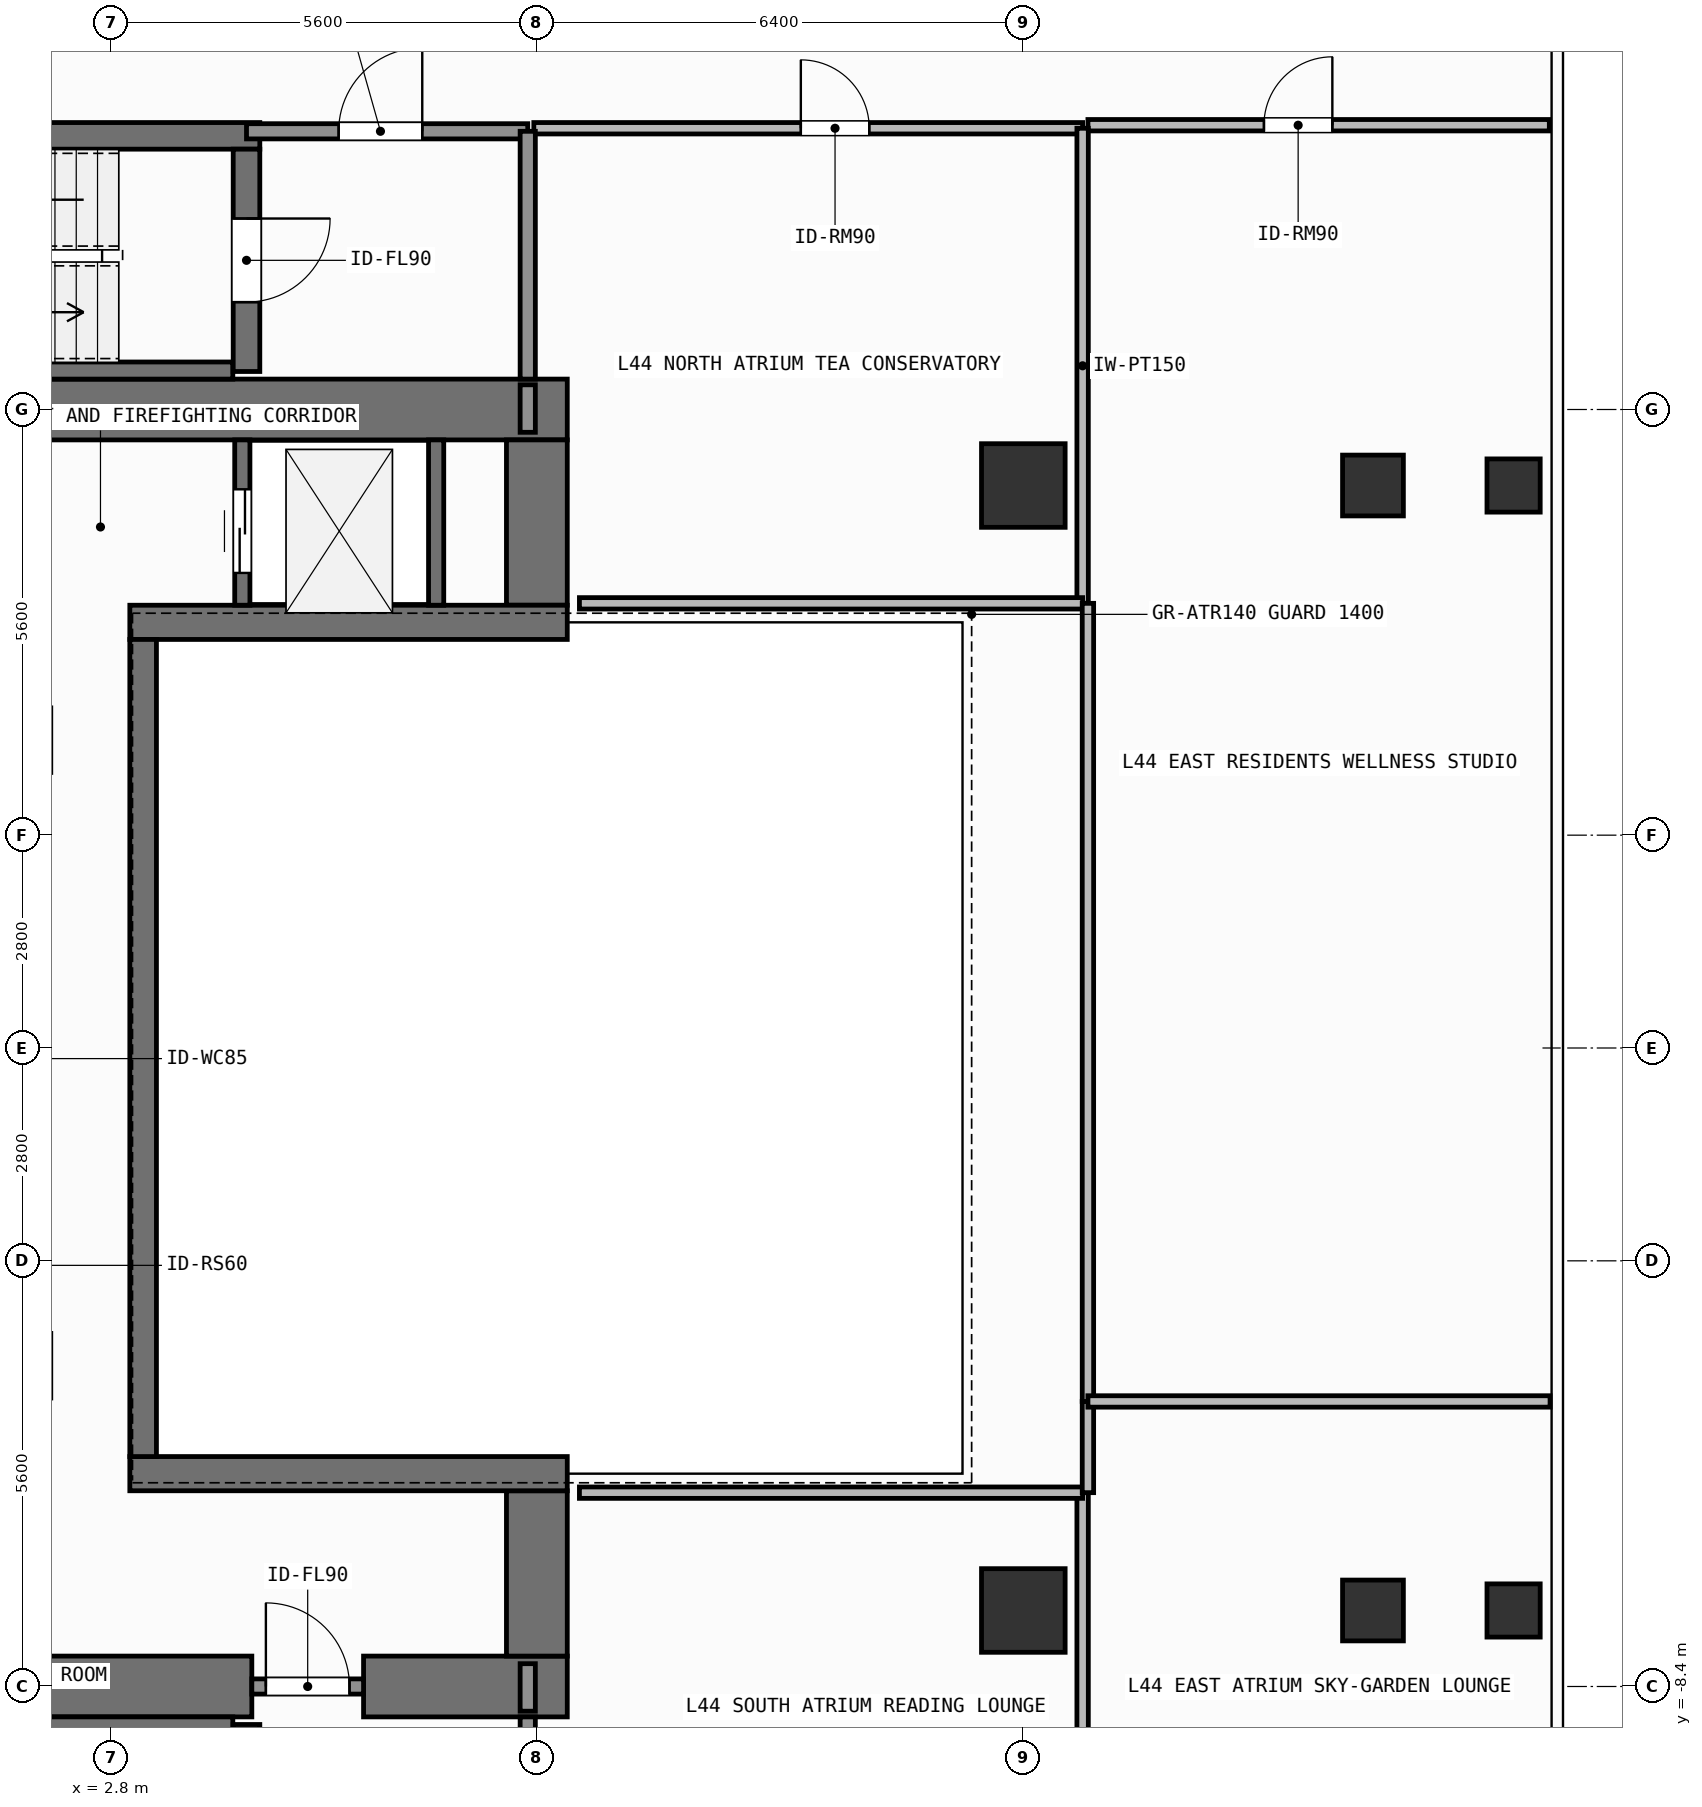
"""IFC4 building model, lengths in metres.
Left out: names, types, materials, properties, quantities, classifications, styles, units other than length and angle.
Written with IfcOpenShell. Run it as: python <this file> out.ifc"""

import sys

from ifc_helpers import new_model, si_unit, direction, frame, frame_2d, origin, origin_2d, place, context, subcontext, project, spatial, rectangle, hollow_rectangle, extrude, element, fill, save


model = new_model("IFC4")
c1 = context("Model", 3, precision=1e-05, world=origin(), true_north=direction((0.0, 1.0)))
c2 = subcontext(c1, "Body", "Model", "MODEL_VIEW")
j1 = project(units=[si_unit("LENGTHUNIT", "METRE"), si_unit("PLANEANGLEUNIT", "RADIAN")], contexts=[c1])
p1 = place(None, origin())
s1 = spatial("IfcSite", under=j1, at=p1, CompositionType="ELEMENT")
p2 = place(p1, origin())
s2 = spatial("IfcBuilding", under=s1, at=p2, CompositionType="ELEMENT")
p3 = place(p2, frame((0.0, 0.0, 179.7)))
s3 = spatial("IfcBuildingStorey", under=s2, at=p3, CompositionType="ELEMENT", Elevation=179.7)
p4 = place(p3, frame((-2.62, -8.4, 0.0), z_axis=(0.0, 0.0, 1.0), x_axis=(1.0, 0.0, 0.0)))
e1 = element("IfcWall", 1, at=p4, inside=s3, PredefinedType="SHEAR", context=c2, shape_type="SweptSolid", body=[
    extrude(rectangle(XDim=7.27, YDim=0.8, at=frame_2d((3.635, 0.0))), origin(), (0.0, 0.0, 1.0), 3.9),
])
p5 = place(p3, frame((6.12, -8.4, 0.0), z_axis=(0.0, 0.0, 1.0), x_axis=(1.0, 0.0, 0.0)))
e2 = element("IfcWall", 2, at=p5, inside=s3, PredefinedType="SHEAR", context=c2, shape_type="SweptSolid", body=[
    extrude(rectangle(XDim=2.68, YDim=0.8, at=frame_2d((1.34, 0.0))), origin(), (0.0, 0.0, 1.0), 3.9),
])
p6 = place(p3, frame((-7.55, 8.4, 0.0), z_axis=(0.0, 0.0, 1.0), x_axis=(1.0, 0.0, 0.0)))
e3 = element("IfcWall", 3, at=p6, inside=s3, PredefinedType="SHEAR", context=c2, shape_type="SweptSolid", body=[
    extrude(rectangle(XDim=16.35, YDim=0.8, at=frame_2d((8.175, 0.0))), origin(), (0.0, 0.0, 1.0), 3.9),
])
for number, where, z_axis, x_axis in (
    (4, (8.4, -8.0, 0.0), (0.0, 0.0, 1.0), (0.0, 1.0, 0.0)),
    (5, (8.4, 5.825, 0.0), (0.0, 0.0, 1.0), (0.0, 1.0, 0.0)),
):
    element("IfcWall", number, at=place(p3, frame(where, z_axis=z_axis, x_axis=x_axis)), inside=s3, PredefinedType="SHEAR", context=c2, shape_type="SweptSolid", body=[
        extrude(rectangle(XDim=2.175, YDim=0.8, at=frame_2d((1.087, 0.0))), origin(), (0.0, 0.0, 1.0), 3.9),
    ])
for number, where, z_axis, x_axis in (
    (6, (3.045, -5.6, 0.0), (0.0, 0.0, 1.0), (1.0, 0.0, 0.0)),
    (7, (3.045, 5.6, 0.0), (0.0, 0.0, 1.0), (1.0, 0.0, 0.0)),
):
    element("IfcWall", number, at=place(p3, frame(where, z_axis=z_axis, x_axis=x_axis)), inside=s3, PredefinedType="SHEAR", context=c2, shape_type="SweptSolid", body=[
        extrude(rectangle(XDim=5.755, YDim=0.45, at=frame_2d((2.877, 0.0))), origin(), (0.0, 0.0, 1.0), 3.9),
    ])
p7 = place(p3, frame((3.22, -5.375, 0.0), z_axis=(0.0, 0.0, 1.0), x_axis=(0.0, 1.0, 0.0)))
e8 = element("IfcWall", 8, at=p7, inside=s3, PredefinedType="SHEAR", context=c2, shape_type="SweptSolid", body=[
    extrude(rectangle(XDim=10.75, YDim=0.35, at=frame_2d((5.375, 0.0))), origin(), (0.0, 0.0, 1.0), 3.9),
])
p8 = place(p3, frame((-2.2, -8.913, 0.0), z_axis=(0.0, 0.0, 1.0), x_axis=(1.0, 0.0, 0.0)))
e9 = element("IfcWall", 9, at=p8, inside=s3, PredefinedType="SHEAR", context=c2, shape_type="SweptSolid", body=[
    extrude(rectangle(XDim=6.6, YDim=0.225, at=frame_2d((3.3, 0.0))), origin(), (0.0, 0.0, 1.0), 3.9),
])
p9 = place(p3, frame((4.58, -8.9, 0.0), z_axis=(0.0, 0.0, 1.0), x_axis=(0.0, -1.0, 0.0)))
e10 = element("IfcWall", 10, at=p9, inside=s3, PredefinedType="SHEAR", context=c2, shape_type="SweptSolid", body=[
    extrude(rectangle(XDim=2.925, YDim=0.35, at=frame_2d((1.462, 0.0))), origin(), (0.0, 0.0, 1.0), 3.9),
])
p10 = place(p9, frame((0.913, 0.0, 0.0)))
e11 = element("IfcOpeningElement", 11, at=p10, cuts=e10, PredefinedType="OPENING", context=c2, shape_type="SweptSolid", body=[
    extrude(rectangle(XDim=1.1, YDim=2.15, at=frame_2d((0.55, 1.075))), frame((0.0, 0.185, 0.0), z_axis=(0.0, -1.0, 0.0), x_axis=(1.0, 0.0, 0.0)), (0.0, 0.0, 1.0), 0.37),
])
p11 = place(p3, frame((-2.555, 12.0, 0.0), z_axis=(0.0, 0.0, 1.0), x_axis=(1.0, 0.0, 0.0)))
e12 = element("IfcWall", 12, at=p11, inside=s3, PredefinedType="SHEAR", context=c2, shape_type="SweptSolid", body=[
    extrude(rectangle(XDim=7.31, YDim=0.35, at=frame_2d((3.655, 0.0))), origin(), (0.0, 0.0, 1.0), 3.9),
])
p12 = place(p3, frame((-2.2, 8.913, 0.0), z_axis=(0.0, 0.0, 1.0), x_axis=(1.0, 0.0, 0.0)))
e13 = element("IfcWall", 13, at=p12, inside=s3, PredefinedType="SHEAR", context=c2, shape_type="SweptSolid", body=[
    extrude(rectangle(XDim=6.6, YDim=0.225, at=frame_2d((3.3, 0.0))), origin(), (0.0, 0.0, 1.0), 3.9),
])
p13 = place(p3, frame((4.58, 11.825, 0.0), z_axis=(0.0, 0.0, 1.0), x_axis=(0.0, -1.0, 0.0)))
e14 = element("IfcWall", 14, at=p13, inside=s3, PredefinedType="SHEAR", context=c2, shape_type="SweptSolid", body=[
    extrude(rectangle(XDim=2.925, YDim=0.35, at=frame_2d((1.462, 0.0))), origin(), (0.0, 0.0, 1.0), 3.9),
])
p14 = place(p13, frame((0.913, 0.0, 0.0)))
e15 = element("IfcOpeningElement", 15, at=p14, cuts=e14, PredefinedType="OPENING", context=c2, shape_type="SweptSolid", body=[
    extrude(rectangle(XDim=1.1, YDim=2.15, at=frame_2d((0.55, 1.075))), frame((0.0, 0.185, 0.0), z_axis=(0.0, -1.0, 0.0), x_axis=(1.0, 0.0, 0.0)), (0.0, 0.0, 1.0), 0.37),
])
for number, where, z_axis, x_axis in (
    (16, (14.8, -7.4, 0.0), (0.0, 0.0, 1.0), (1.0, 0.0, 0.0)),
    (17, (14.8, 7.4, 0.0), (0.0, 0.0, 1.0), (1.0, 0.0, 0.0)),
):
    element("IfcColumn", number, at=place(p3, frame(where, z_axis=z_axis, x_axis=x_axis)), inside=s3, PredefinedType="COLUMN", context=c2, shape_type="SweptSolid", body=[
        extrude(rectangle(XDim=1.1, YDim=1.1, at=origin_2d()), origin(), (0.0, 0.0, 1.0), 3.9),
    ])
for number, where, z_axis, x_axis in (
    (18, (19.4, -7.4, 0.0), (0.0, 0.0, 1.0), (1.0, 0.0, 0.0)),
    (19, (19.4, 7.4, 0.0), (0.0, 0.0, 1.0), (1.0, 0.0, 0.0)),
):
    element("IfcColumn", number, at=place(p3, frame(where, z_axis=z_axis, x_axis=x_axis)), inside=s3, PredefinedType="COLUMN", context=c2, shape_type="SweptSolid", body=[
        extrude(hollow_rectangle(XDim=0.8, YDim=0.8, WallThickness=0.036, at=origin_2d()), origin(), (0.0, 0.0, 1.0), 3.9),
    ])
for number, where, z_axis, x_axis in (
    (20, (21.25, -7.4, 0.0), (0.0, 0.0, 1.0), (1.0, 0.0, 0.0)),
    (21, (21.25, 7.4, 0.0), (0.0, 0.0, 1.0), (1.0, 0.0, 0.0)),
):
    element("IfcColumn", number, at=place(p3, frame(where, z_axis=z_axis, x_axis=x_axis)), inside=s3, PredefinedType="COLUMN", context=c2, shape_type="SweptSolid", body=[
        extrude(hollow_rectangle(XDim=0.7, YDim=0.7, WallThickness=0.032, at=origin_2d()), origin(), (0.0, 0.0, 1.0), 3.9),
    ])
p15 = place(p3, frame((4.525, 5.825, 0.0), z_axis=(0.0, 0.0, 1.0), x_axis=(0.0, 1.0, 0.0)))
e22 = element("IfcWall", 22, at=p15, inside=s3, PredefinedType="SHEAR", context=c2, shape_type="SweptSolid", body=[
    extrude(rectangle(XDim=2.175, YDim=0.2, at=frame_2d((1.087, 0.0))), origin(), (0.0, 0.0, 1.0), 3.68),
])
p16 = place(p15, frame((0.425, 0.0, 0.0)))
e23 = element("IfcOpeningElement", 23, at=p16, cuts=e22, PredefinedType="OPENING", context=c2, shape_type="SweptSolid", body=[
    extrude(rectangle(XDim=1.1, YDim=2.2, at=frame_2d((0.55, 1.1))), frame((0.0, 0.11, 0.0), z_axis=(0.0, -1.0, 0.0), x_axis=(1.0, 0.0, 0.0)), (0.0, 0.0, 1.0), 0.22),
])
p17 = place(p3, frame((7.075, 5.825, 0.0), z_axis=(0.0, 0.0, 1.0), x_axis=(0.0, 1.0, 0.0)))
e24 = element("IfcWall", 24, at=p17, inside=s3, PredefinedType="SHEAR", context=c2, shape_type="SweptSolid", body=[
    extrude(rectangle(XDim=2.175, YDim=0.2, at=frame_2d((1.087, 0.0))), origin(), (0.0, 0.0, 1.0), 3.68),
])
p18 = place(p3, frame((4.65, -8.4, 0.0), z_axis=(0.0, 0.0, 1.0), x_axis=(1.0, 0.0, 0.0)))
e25 = element("IfcWall", 25, at=p18, inside=s3, PredefinedType="SOLIDWALL", context=c2, shape_type="SweptSolid", body=[
    extrude(rectangle(XDim=1.47, YDim=0.2, at=frame_2d((0.735, 0.0))), origin(), (0.0, 0.0, 1.0), 2.82),
])
p19 = place(p18, frame((0.185, 0.0, 0.0)))
e26 = element("IfcOpeningElement", 26, at=p19, cuts=e25, PredefinedType="OPENING", context=c2, shape_type="SweptSolid", body=[
    extrude(rectangle(XDim=1.1, YDim=2.15, at=frame_2d((0.55, 1.075))), frame((0.0, 0.11, 0.0), z_axis=(0.0, -1.0, 0.0), x_axis=(1.0, 0.0, 0.0)), (0.0, 0.0, 1.0), 0.22),
])
p20 = place(p3, frame((4.58, 12.06, 0.0), z_axis=(0.0, 0.0, 1.0), x_axis=(1.0, 0.0, 0.0)))
e27 = element("IfcWall", 27, at=p20, inside=s3, PredefinedType="SOLIDWALL", context=c2, shape_type="SweptSolid", body=[
    extrude(rectangle(XDim=3.7, YDim=0.2, at=frame_2d((1.85, 0.0))), origin(), (0.0, 0.0, 1.0), 3.68),
])
p21 = place(p20, frame((1.212, 0.0, 0.0)))
e28 = element("IfcOpeningElement", 28, at=p21, cuts=e27, PredefinedType="OPENING", context=c2, shape_type="SweptSolid", body=[
    extrude(rectangle(XDim=1.1, YDim=2.15, at=frame_2d((0.55, 1.075))), frame((0.0, 0.11, 0.0), z_axis=(0.0, -1.0, 0.0), x_axis=(1.0, 0.0, 0.0)), (0.0, 0.0, 1.0), 0.22),
])
p22 = place(p3, frame((8.36, 12.1, 0.0), z_axis=(0.0, 0.0, 1.0), x_axis=(1.0, 0.0, 0.0)))
e29 = element("IfcWall", 29, at=p22, inside=s3, PredefinedType="PARTITIONING", context=c2, shape_type="SweptSolid", body=[
    extrude(rectangle(XDim=7.22, YDim=0.15, at=frame_2d((3.61, 0.0))), origin(), (0.0, 0.0, 1.0), 3.68),
])
p23 = place(p22, frame((3.513, 0.0, 0.0)))
e30 = element("IfcOpeningElement", 30, at=p23, cuts=e29, PredefinedType="OPENING", context=c2, shape_type="SweptSolid", body=[
    extrude(rectangle(XDim=0.9, YDim=2.1, at=frame_2d((0.45, 1.05))), frame((0.0, 0.085, 0.0), z_axis=(0.0, -1.0, 0.0), x_axis=(1.0, 0.0, 0.0)), (0.0, 0.0, 1.0), 0.17),
])
p24 = place(p3, frame((15.65, 12.14, 0.0), z_axis=(0.0, 0.0, 1.0), x_axis=(1.0, 0.0, 0.0)))
e31 = element("IfcWall", 31, at=p24, inside=s3, PredefinedType="PARTITIONING", context=c2, shape_type="SweptSolid", body=[
    extrude(rectangle(XDim=6.07, YDim=0.15, at=frame_2d((3.035, 0.0))), origin(), (0.0, 0.0, 1.0), 3.68),
])
p25 = place(p24, frame((2.316, 0.0, 0.0)))
e32 = element("IfcOpeningElement", 32, at=p25, cuts=e31, PredefinedType="OPENING", context=c2, shape_type="SweptSolid", body=[
    extrude(rectangle(XDim=0.9, YDim=2.1, at=frame_2d((0.45, 1.05))), frame((0.0, 0.085, 0.0), z_axis=(0.0, -1.0, 0.0), x_axis=(1.0, 0.0, 0.0)), (0.0, 0.0, 1.0), 0.17),
])
for number, where, z_axis, x_axis in (
    (33, (8.28, -12.06, 0.0), (0.0, 0.0, 1.0), (0.0, 1.0, 0.0)),
    (34, (8.28, 8.8, 0.0), (0.0, 0.0, 1.0), (0.0, 1.0, 0.0)),
):
    element("IfcWall", number, at=place(p3, frame(where, z_axis=z_axis, x_axis=x_axis)), inside=s3, PredefinedType="SOLIDWALL", context=c2, shape_type="SweptSolid", body=[
        extrude(rectangle(XDim=3.26, YDim=0.2, at=frame_2d((1.63, 0.0))), origin(), (0.0, 0.0, 1.0), 3.68),
    ])
p26 = place(p3, frame((8.28, -8.725, 0.0), z_axis=(0.0, 0.0, 1.0), x_axis=(0.0, 1.0, 0.0)))
e35 = element("IfcWall", 35, at=p26, inside=s3, PredefinedType="SOLIDWALL", context=c2, shape_type="SweptSolid", body=[
    extrude(rectangle(XDim=0.625, YDim=0.2, at=frame_2d((0.312, 0.0))), origin(), (0.0, 0.0, 1.0), 3.68),
])
p27 = place(p3, frame((15.58, -12.1, 0.0), z_axis=(0.0, 0.0, 1.0), x_axis=(0.0, 1.0, 0.0)))
e36 = element("IfcWall", 36, at=p27, inside=s3, PredefinedType="PARTITIONING", context=c2, shape_type="SweptSolid", body=[
    extrude(rectangle(XDim=6.25, YDim=0.15, at=frame_2d((3.125, 0.0))), origin(), (0.0, 0.0, 1.0), 3.68),
])
p28 = place(p3, frame((8.96, -5.85, 0.0), z_axis=(0.0, 0.0, 1.0), x_axis=(1.0, 0.0, 0.0)))
e37 = element("IfcWall", 37, at=p28, inside=s3, PredefinedType="PARTITIONING", context=c2, shape_type="SweptSolid", body=[
    extrude(rectangle(XDim=6.62, YDim=0.15, at=frame_2d((3.31, 0.0))), origin(), (0.0, 0.0, 1.0), 3.68),
])
p29 = place(p3, frame((8.28, 8.1, 0.0), z_axis=(0.0, 0.0, 1.0), x_axis=(0.0, 1.0, 0.0)))
e38 = element("IfcWall", 38, at=p29, inside=s3, PredefinedType="SOLIDWALL", context=c2, shape_type="SweptSolid", body=[
    extrude(rectangle(XDim=0.625, YDim=0.2, at=frame_2d((0.312, 0.0))), origin(), (0.0, 0.0, 1.0), 3.68),
])
p30 = place(p3, frame((15.58, 5.85, 0.0), z_axis=(0.0, 0.0, 1.0), x_axis=(0.0, 1.0, 0.0)))
e39 = element("IfcWall", 39, at=p30, inside=s3, PredefinedType="PARTITIONING", context=c2, shape_type="SweptSolid", body=[
    extrude(rectangle(XDim=6.25, YDim=0.15, at=frame_2d((3.125, 0.0))), origin(), (0.0, 0.0, 1.0), 3.68),
])
p31 = place(p3, frame((8.96, 5.85, 0.0), z_axis=(0.0, 0.0, 1.0), x_axis=(1.0, 0.0, 0.0)))
e40 = element("IfcWall", 40, at=p31, inside=s3, PredefinedType="PARTITIONING", context=c2, shape_type="SweptSolid", body=[
    extrude(rectangle(XDim=6.62, YDim=0.15, at=frame_2d((3.31, 0.0))), origin(), (0.0, 0.0, 1.0), 3.68),
])
p32 = place(p3, frame((15.65, -5.85, 0.0), z_axis=(0.0, 0.0, 1.0), x_axis=(0.0, 1.0, 0.0)))
e41 = element("IfcWall", 41, at=p32, inside=s3, PredefinedType="PARTITIONING", context=c2, shape_type="SweptSolid", body=[
    extrude(rectangle(XDim=1.2, YDim=0.15, at=frame_2d((0.6, 0.0))), origin(), (0.0, 0.0, 1.0), 3.68),
])
p33 = place(p3, frame((15.65, -4.65, 0.0), z_axis=(0.0, 0.0, 1.0), x_axis=(0.0, 1.0, 0.0)))
e42 = element("IfcWall", 42, at=p33, inside=s3, PredefinedType="PARTITIONING", context=c2, shape_type="SweptSolid", body=[
    extrude(rectangle(XDim=10.5, YDim=0.15, at=frame_2d((5.25, 0.0))), origin(), (0.0, 0.0, 1.0), 3.68),
])
p34 = place(p3, frame((15.65, -4.65, 0.0), z_axis=(0.0, 0.0, 1.0), x_axis=(1.0, 0.0, 0.0)))
e43 = element("IfcWall", 43, at=p34, inside=s3, PredefinedType="PARTITIONING", context=c2, shape_type="SweptSolid", body=[
    extrude(rectangle(XDim=6.08, YDim=0.15, at=frame_2d((3.04, 0.0))), origin(), (0.0, 0.0, 1.0), 3.68),
])
p35 = place(p16, origin())
e44 = element("IfcDoor", 44, at=p35, inside=s3, OperationType="SLIDING_TO_LEFT", PredefinedType="DOOR", context=c2, shape_type="SweptSolid", body=[
    extrude(rectangle(XDim=1.1, YDim=2.2, at=frame_2d((0.55, 1.1))), frame((0.0, 0.025, 0.0), z_axis=(0.0, -1.0, 0.0), x_axis=(1.0, 0.0, 0.0)), (0.0, 0.0, 1.0), 0.05),
])
fill(e23, e44)
p36 = place(p14, origin())
e45 = element("IfcDoor", 45, at=p36, inside=s3, OperationType="SINGLE_SWING_LEFT", PredefinedType="DOOR", context=c2, shape_type="SweptSolid", body=[
    extrude(rectangle(XDim=1.1, YDim=2.15, at=frame_2d((0.55, 1.075))), frame((0.0, 0.025, 0.0), z_axis=(0.0, -1.0, 0.0), x_axis=(1.0, 0.0, 0.0)), (0.0, 0.0, 1.0), 0.05),
])
fill(e15, e45)
p37 = place(p19, origin())
e46 = element("IfcDoor", 46, at=p37, inside=s3, OperationType="SINGLE_SWING_LEFT", PredefinedType="DOOR", context=c2, shape_type="SweptSolid", body=[
    extrude(rectangle(XDim=1.1, YDim=2.15, at=frame_2d((0.55, 1.075))), frame((0.0, 0.025, 0.0), z_axis=(0.0, -1.0, 0.0), x_axis=(1.0, 0.0, 0.0)), (0.0, 0.0, 1.0), 0.05),
])
fill(e26, e46)
p38 = place(p21, origin())
e47 = element("IfcDoor", 47, at=p38, inside=s3, OperationType="SINGLE_SWING_RIGHT", PredefinedType="DOOR", context=c2, shape_type="SweptSolid", body=[
    extrude(rectangle(XDim=1.1, YDim=2.15, at=frame_2d((0.55, 1.075))), frame((0.0, 0.025, 0.0), z_axis=(0.0, -1.0, 0.0), x_axis=(1.0, 0.0, 0.0)), (0.0, 0.0, 1.0), 0.05),
])
fill(e28, e47)
p39 = place(p23, origin())
e48 = element("IfcDoor", 48, at=p39, inside=s3, OperationType="SINGLE_SWING_LEFT", PredefinedType="DOOR", context=c2, shape_type="SweptSolid", body=[
    extrude(rectangle(XDim=0.9, YDim=2.1, at=frame_2d((0.45, 1.05))), frame((0.0, 0.025, 0.0), z_axis=(0.0, -1.0, 0.0), x_axis=(1.0, 0.0, 0.0)), (0.0, 0.0, 1.0), 0.05),
])
fill(e30, e48)
p40 = place(p25, origin())
e49 = element("IfcDoor", 49, at=p40, inside=s3, OperationType="SINGLE_SWING_RIGHT", PredefinedType="DOOR", context=c2, shape_type="SweptSolid", body=[
    extrude(rectangle(XDim=0.9, YDim=2.1, at=frame_2d((0.45, 1.05))), frame((0.0, 0.025, 0.0), z_axis=(0.0, -1.0, 0.0), x_axis=(1.0, 0.0, 0.0)), (0.0, 0.0, 1.0), 0.05),
])
fill(e32, e49)
save(model, sys.argv[1])
